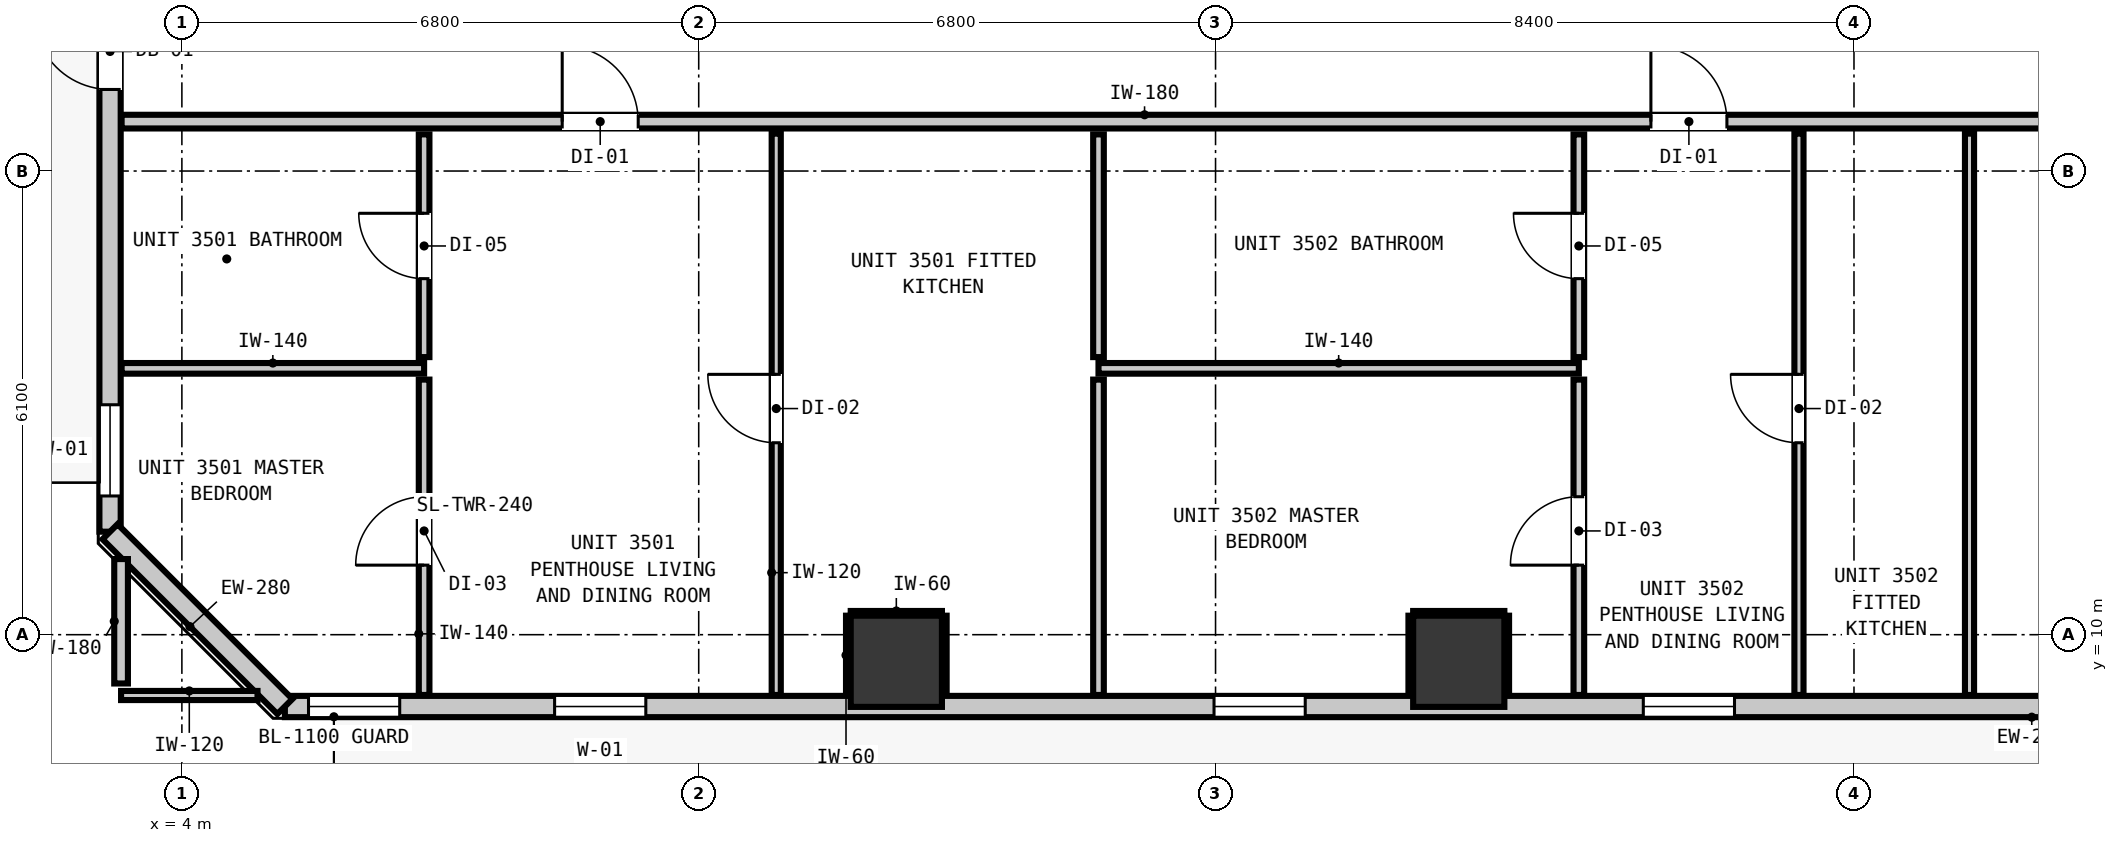
"""IFC4 building model, lengths in metres.
Left out: names, types, materials, properties, quantities, classifications, styles, units other than length and angle.
Written with IfcOpenShell. Run it as: python <this file> out.ifc"""

import sys

from ifc_helpers import new_model, si_unit, direction, frame, frame_2d, origin, origin_2d, place, context, subcontext, project, spatial, rectangle, extrude, element, fill, save


model = new_model("IFC4")
c1 = context("Model", 3, precision=1e-05, world=origin(), true_north=direction((0.0, 1.0)))
c2 = subcontext(c1, "Body", "Model", "MODEL_VIEW")
j1 = project(units=[si_unit("LENGTHUNIT", "METRE"), si_unit("PLANEANGLEUNIT", "RADIAN")], contexts=[c1])
p1 = place(None, origin())
s1 = spatial("IfcSite", under=j1, at=p1, CompositionType="ELEMENT")
p2 = place(p1, origin())
s2 = spatial("IfcBuilding", under=s1, at=p2, CompositionType="ELEMENT")
p3 = place(p2, frame((0.0, 0.0, 122.68)))
s3 = spatial("IfcBuildingStorey", under=s2, at=p3, CompositionType="ELEMENT", Elevation=122.68)
for number, where, z_axis, x_axis in (
    (1, (13.4, 9.65, 0.0), (0.0, 0.0, 1.0), (1.0, 0.0, 0.0)),
    (2, (20.8, 9.65, 0.0), (0.0, 0.0, 1.0), (1.0, 0.0, 0.0)),
):
    element("IfcColumn", number, at=place(p3, frame(where, z_axis=z_axis, x_axis=x_axis)), inside=s3, PredefinedType="COLUMN", context=c2, shape_type="SweptSolid", body=[
        extrude(rectangle(XDim=1.2, YDim=1.2, at=origin_2d()), origin(), (0.0, 0.0, 1.0), 2.9),
    ])
p4 = place(p3, frame((3.055, 11.355, 0.0), z_axis=(0.0, 0.0, 1.0), x_axis=(0.0, 1.0, 0.0)))
e3 = element("IfcWall", 3, at=p4, inside=s3, PredefinedType="STANDARD", context=c2, shape_type="SweptSolid", body=[
    extrude(rectangle(XDim=32.29, YDim=0.28, at=frame_2d((16.145, 0.0))), origin(), (0.0, 0.0, 1.0), 2.9),
])
p5 = place(p4, frame((5.818, 0.0, 0.0)))
e4 = element("IfcOpeningElement", 4, at=p5, cuts=e3, PredefinedType="OPENING", context=c2, shape_type="SweptSolid", body=[
    extrude(rectangle(XDim=1.0, YDim=2.15, at=frame_2d((0.5, 1.075))), frame((0.0, 0.15, 0.0), z_axis=(0.0, -1.0, 0.0), x_axis=(1.0, 0.0, 0.0)), (0.0, 0.0, 1.0), 0.3),
])
p6 = place(p4, frame((0.47, 0.0, 0.85)))
e5 = element("IfcOpeningElement", 5, at=p6, cuts=e3, PredefinedType="OPENING", context=c2, shape_type="SweptSolid", body=[
    extrude(rectangle(XDim=1.2, YDim=1.8, at=frame_2d((0.6, 0.9))), frame((0.0, 0.15, 0.0), z_axis=(0.0, -1.0, 0.0), x_axis=(1.0, 0.0, 0.0)), (0.0, 0.0, 1.0), 0.3),
])
p7 = place(p4, frame((14.395, 0.0, 0.85)))
e6 = element("IfcOpeningElement", 6, at=p7, cuts=e3, PredefinedType="OPENING", context=c2, shape_type="SweptSolid", body=[
    extrude(rectangle(XDim=1.2, YDim=1.8, at=frame_2d((0.6, 0.9))), frame((0.0, 0.15, 0.0), z_axis=(0.0, -1.0, 0.0), x_axis=(1.0, 0.0, 0.0)), (0.0, 0.0, 1.0), 0.3),
])
p8 = place(p3, frame((40.445, 9.055, 0.0), z_axis=(0.0, 0.0, 1.0), x_axis=(-1.0, 0.0, 0.0)))
e7 = element("IfcWall", 7, at=p8, inside=s3, PredefinedType="STANDARD", context=c2, shape_type="SweptSolid", body=[
    extrude(rectangle(XDim=35.09, YDim=0.28, at=frame_2d((17.545, 0.0))), origin(), (0.0, 0.0, 1.0), 2.9),
])
p9 = place(p8, frame((0.904, 0.0, 0.0)))
e8 = element("IfcOpeningElement", 8, at=p9, cuts=e7, PredefinedType="OPENING", context=c2, shape_type="SweptSolid", body=[
    extrude(rectangle(XDim=1.0, YDim=2.15, at=frame_2d((0.5, 1.075))), frame((0.0, 0.15, 0.0), z_axis=(0.0, -1.0, 0.0), x_axis=(1.0, 0.0, 0.0)), (0.0, 0.0, 1.0), 0.3),
])
p10 = place(p8, frame((30.341, 0.0, 0.85)))
e9 = element("IfcOpeningElement", 9, at=p10, cuts=e7, PredefinedType="OPENING", context=c2, shape_type="SweptSolid", body=[
    extrude(rectangle(XDim=1.2, YDim=1.8, at=frame_2d((0.6, 0.9))), frame((0.0, 0.15, 0.0), z_axis=(0.0, -1.0, 0.0), x_axis=(1.0, 0.0, 0.0)), (0.0, 0.0, 1.0), 0.3),
])
p11 = place(p8, frame((33.579, 0.0, 0.85)))
e10 = element("IfcOpeningElement", 10, at=p11, cuts=e7, PredefinedType="OPENING", context=c2, shape_type="SweptSolid", body=[
    extrude(rectangle(XDim=1.2, YDim=1.8, at=frame_2d((0.6, 0.9))), frame((0.0, 0.15, 0.0), z_axis=(0.0, -1.0, 0.0), x_axis=(1.0, 0.0, 0.0)), (0.0, 0.0, 1.0), 0.3),
])
p12 = place(p8, frame((16.017, 0.0, 0.85)))
e11 = element("IfcOpeningElement", 11, at=p12, cuts=e7, PredefinedType="OPENING", context=c2, shape_type="SweptSolid", body=[
    extrude(rectangle(XDim=1.2, YDim=1.8, at=frame_2d((0.6, 0.9))), frame((0.0, 0.15, 0.0), z_axis=(0.0, -1.0, 0.0), x_axis=(1.0, 0.0, 0.0)), (0.0, 0.0, 1.0), 0.3),
])
p13 = place(p8, frame((21.665, 0.0, 0.85)))
e12 = element("IfcOpeningElement", 12, at=p13, cuts=e7, PredefinedType="OPENING", context=c2, shape_type="SweptSolid", body=[
    extrude(rectangle(XDim=1.2, YDim=1.8, at=frame_2d((0.6, 0.9))), frame((0.0, 0.15, 0.0), z_axis=(0.0, -1.0, 0.0), x_axis=(1.0, 0.0, 0.0)), (0.0, 0.0, 1.0), 0.3),
])
p14 = place(p8, frame((6.995, 0.0, 0.85)))
e13 = element("IfcOpeningElement", 13, at=p14, cuts=e7, PredefinedType="OPENING", context=c2, shape_type="SweptSolid", body=[
    extrude(rectangle(XDim=1.2, YDim=1.8, at=frame_2d((0.6, 0.9))), frame((0.0, 0.15, 0.0), z_axis=(0.0, -1.0, 0.0), x_axis=(1.0, 0.0, 0.0)), (0.0, 0.0, 1.0), 0.3),
])
p15 = place(p3, frame((5.355, 9.055, 0.0), z_axis=(0.0, 0.0, 1.0), x_axis=(-0.707106781187, 0.707106781187, 0.0)))
e14 = element("IfcWall", 14, at=p15, inside=s3, PredefinedType="STANDARD", context=c2, shape_type="SweptSolid", body=[
    extrude(rectangle(XDim=3.253, YDim=0.28, at=frame_2d((1.626, 0.0))), origin(), (0.0, 0.0, 1.0), 2.9),
])
p16 = place(p3, frame((3.207, 16.75, 0.0), z_axis=(0.0, 0.0, 1.0), x_axis=(1.0, 0.0, 0.0)))
e15 = element("IfcWall", 15, at=p16, inside=s3, PredefinedType="PARTITIONING", context=c2, shape_type="SweptSolid", body=[
    extrude(rectangle(XDim=39.386, YDim=0.18, at=frame_2d((19.693, 0.0))), origin(), (0.0, 0.0, 1.0), 2.9),
])
p17 = place(p16, frame((5.797, 0.0, 0.0)))
e16 = element("IfcOpeningElement", 16, at=p17, cuts=e15, PredefinedType="OPENING", context=c2, shape_type="SweptSolid", body=[
    extrude(rectangle(XDim=1.0, YDim=2.15, at=frame_2d((0.5, 1.075))), frame((0.0, 0.1, 0.0), z_axis=(0.0, -1.0, 0.0), x_axis=(1.0, 0.0, 0.0)), (0.0, 0.0, 1.0), 0.2),
])
p18 = place(p16, frame((20.121, 0.0, 0.0)))
e17 = element("IfcOpeningElement", 17, at=p18, cuts=e15, PredefinedType="OPENING", context=c2, shape_type="SweptSolid", body=[
    extrude(rectangle(XDim=1.0, YDim=2.15, at=frame_2d((0.5, 1.075))), frame((0.0, 0.1, 0.0), z_axis=(0.0, -1.0, 0.0), x_axis=(1.0, 0.0, 0.0)), (0.0, 0.0, 1.0), 0.2),
])
p19 = place(p16, frame((31.379, 0.0, 0.0)))
e18 = element("IfcOpeningElement", 18, at=p19, cuts=e15, PredefinedType="OPENING", context=c2, shape_type="SweptSolid", body=[
    extrude(rectangle(XDim=0.9, YDim=2.1, at=frame_2d((0.45, 1.05))), frame((0.0, 0.1, 0.0), z_axis=(0.0, -1.0, 0.0), x_axis=(1.0, 0.0, 0.0)), (0.0, 0.0, 1.0), 0.2),
])
p20 = place(p3, frame((3.207, 13.504, 0.0), z_axis=(0.0, 0.0, 1.0), x_axis=(1.0, 0.0, 0.0)))
e19 = element("IfcWall", 19, at=p20, inside=s3, PredefinedType="PARTITIONING", context=c2, shape_type="SweptSolid", body=[
    extrude(rectangle(XDim=3.98, YDim=0.14, at=frame_2d((1.99, 0.0))), origin(), (0.0, 0.0, 1.0), 2.9),
])
p21 = place(p3, frame((16.06, 13.504, 0.0), z_axis=(0.0, 0.0, 1.0), x_axis=(1.0, 0.0, 0.0)))
e20 = element("IfcWall", 20, at=p21, inside=s3, PredefinedType="PARTITIONING", context=c2, shape_type="SweptSolid", body=[
    extrude(rectangle(XDim=6.32, YDim=0.14, at=frame_2d((3.16, 0.0))), origin(), (0.0, 0.0, 1.0), 2.9),
])
p22 = place(p3, frame((3.2, 9.2, 0.0), z_axis=(0.0, 0.0, 1.0), x_axis=(1.0, 0.0, 0.0)))
e21 = element("IfcWall", 21, at=p22, inside=s3, PredefinedType="PARTITIONING", context=c2, shape_type="SweptSolid", body=[
    extrude(rectangle(XDim=1.795, YDim=0.12, at=frame_2d((0.897, 0.0))), origin(), (0.0, 0.0, 1.0), 2.9),
])
p23 = place(p3, frame((3.2, 9.358, 0.0), z_axis=(0.0, 0.0, 1.0), x_axis=(0.0, 1.0, 0.0)))
e22 = element("IfcWall", 22, at=p23, inside=s3, PredefinedType="PARTITIONING", context=c2, shape_type="SweptSolid", body=[
    extrude(rectangle(XDim=1.637, YDim=0.18, at=frame_2d((0.819, 0.0))), origin(), (0.0, 0.0, 1.0), 2.9),
])
p24 = place(p3, frame((7.187, 9.207, 0.0), z_axis=(0.0, 0.0, 1.0), x_axis=(0.0, 1.0, 0.0)))
e23 = element("IfcWall", 23, at=p24, inside=s3, PredefinedType="PARTITIONING", context=c2, shape_type="SweptSolid", body=[
    extrude(rectangle(XDim=4.149, YDim=0.14, at=frame_2d((2.074, 0.0))), origin(), (0.0, 0.0, 1.0), 2.9),
])
p25 = place(p24, frame((1.708, 0.0, 0.0)))
e24 = element("IfcOpeningElement", 24, at=p25, cuts=e23, PredefinedType="OPENING", context=c2, shape_type="SweptSolid", body=[
    extrude(rectangle(XDim=0.9, YDim=2.1, at=frame_2d((0.45, 1.05))), frame((0.0, 0.08, 0.0), z_axis=(0.0, -1.0, 0.0), x_axis=(1.0, 0.0, 0.0)), (0.0, 0.0, 1.0), 0.16),
])
p26 = place(p3, frame((7.187, 13.652, 0.0), z_axis=(0.0, 0.0, 1.0), x_axis=(0.0, 1.0, 0.0)))
e25 = element("IfcWall", 25, at=p26, inside=s3, PredefinedType="PARTITIONING", context=c2, shape_type="SweptSolid", body=[
    extrude(rectangle(XDim=2.93, YDim=0.14, at=frame_2d((1.465, 0.0))), origin(), (0.0, 0.0, 1.0), 2.9),
])
p27 = place(p26, frame((1.032, 0.0, 0.0)))
e26 = element("IfcOpeningElement", 26, at=p27, cuts=e25, PredefinedType="OPENING", context=c2, shape_type="SweptSolid", body=[
    extrude(rectangle(XDim=0.86, YDim=2.02, at=frame_2d((0.43, 1.01))), frame((0.0, 0.08, 0.0), z_axis=(0.0, -1.0, 0.0), x_axis=(1.0, 0.0, 0.0)), (0.0, 0.0, 1.0), 0.16),
])
p28 = place(p3, frame((16.06, 9.207, 0.0), z_axis=(0.0, 0.0, 1.0), x_axis=(0.0, 1.0, 0.0)))
e27 = element("IfcWall", 27, at=p28, inside=s3, PredefinedType="PARTITIONING", context=c2, shape_type="SweptSolid", body=[
    extrude(rectangle(XDim=4.149, YDim=0.14, at=frame_2d((2.074, 0.0))), origin(), (0.0, 0.0, 1.0), 2.9),
])
p29 = place(p3, frame((16.06, 13.652, 0.0), z_axis=(0.0, 0.0, 1.0), x_axis=(0.0, 1.0, 0.0)))
e28 = element("IfcWall", 28, at=p29, inside=s3, PredefinedType="PARTITIONING", context=c2, shape_type="SweptSolid", body=[
    extrude(rectangle(XDim=2.93, YDim=0.14, at=frame_2d((1.465, 0.0))), origin(), (0.0, 0.0, 1.0), 2.9),
])
p30 = place(p3, frame((22.38, 9.207, 0.0), z_axis=(0.0, 0.0, 1.0), x_axis=(0.0, 1.0, 0.0)))
e29 = element("IfcWall", 29, at=p30, inside=s3, PredefinedType="PARTITIONING", context=c2, shape_type="SweptSolid", body=[
    extrude(rectangle(XDim=4.149, YDim=0.14, at=frame_2d((2.074, 0.0))), origin(), (0.0, 0.0, 1.0), 2.9),
])
p31 = place(p30, frame((1.708, 0.0, 0.0)))
e30 = element("IfcOpeningElement", 30, at=p31, cuts=e29, PredefinedType="OPENING", context=c2, shape_type="SweptSolid", body=[
    extrude(rectangle(XDim=0.9, YDim=2.1, at=frame_2d((0.45, 1.05))), frame((0.0, 0.08, 0.0), z_axis=(0.0, -1.0, 0.0), x_axis=(1.0, 0.0, 0.0)), (0.0, 0.0, 1.0), 0.16),
])
p32 = place(p3, frame((22.38, 13.652, 0.0), z_axis=(0.0, 0.0, 1.0), x_axis=(0.0, 1.0, 0.0)))
e31 = element("IfcWall", 31, at=p32, inside=s3, PredefinedType="PARTITIONING", context=c2, shape_type="SweptSolid", body=[
    extrude(rectangle(XDim=2.93, YDim=0.14, at=frame_2d((1.465, 0.0))), origin(), (0.0, 0.0, 1.0), 2.9),
])
p33 = place(p32, frame((1.032, 0.0, 0.0)))
e32 = element("IfcOpeningElement", 32, at=p33, cuts=e31, PredefinedType="OPENING", context=c2, shape_type="SweptSolid", body=[
    extrude(rectangle(XDim=0.86, YDim=2.02, at=frame_2d((0.43, 1.01))), frame((0.0, 0.08, 0.0), z_axis=(0.0, -1.0, 0.0), x_axis=(1.0, 0.0, 0.0)), (0.0, 0.0, 1.0), 0.16),
])
p34 = place(p3, frame((11.82, 9.207, 0.0), z_axis=(0.0, 0.0, 1.0), x_axis=(0.0, 1.0, 0.0)))
e33 = element("IfcWall", 33, at=p34, inside=s3, PredefinedType="PARTITIONING", context=c2, shape_type="SweptSolid", body=[
    extrude(rectangle(XDim=7.385, YDim=0.12, at=frame_2d((3.692, 0.0))), origin(), (0.0, 0.0, 1.0), 2.9),
])
p35 = place(p34, frame((3.318, 0.0, 0.0)))
e34 = element("IfcOpeningElement", 34, at=p35, cuts=e33, PredefinedType="OPENING", context=c2, shape_type="SweptSolid", body=[
    extrude(rectangle(XDim=0.9, YDim=2.1, at=frame_2d((0.45, 1.05))), frame((0.0, 0.07, 0.0), z_axis=(0.0, -1.0, 0.0), x_axis=(1.0, 0.0, 0.0)), (0.0, 0.0, 1.0), 0.14),
])
p36 = place(p3, frame((25.276, 9.207, 0.0), z_axis=(0.0, 0.0, 1.0), x_axis=(0.0, 1.0, 0.0)))
e35 = element("IfcWall", 35, at=p36, inside=s3, PredefinedType="PARTITIONING", context=c2, shape_type="SweptSolid", body=[
    extrude(rectangle(XDim=7.385, YDim=0.12, at=frame_2d((3.692, 0.0))), origin(), (0.0, 0.0, 1.0), 2.9),
])
p37 = place(p36, frame((3.318, 0.0, 0.0)))
e36 = element("IfcOpeningElement", 36, at=p37, cuts=e35, PredefinedType="OPENING", context=c2, shape_type="SweptSolid", body=[
    extrude(rectangle(XDim=0.9, YDim=2.1, at=frame_2d((0.45, 1.05))), frame((0.0, 0.07, 0.0), z_axis=(0.0, -1.0, 0.0), x_axis=(1.0, 0.0, 0.0)), (0.0, 0.0, 1.0), 0.14),
])
p38 = place(p3, frame((27.52, 9.207, 0.0), z_axis=(0.0, 0.0, 1.0), x_axis=(0.0, 1.0, 0.0)))
e37 = element("IfcWall", 37, at=p38, inside=s3, PredefinedType="PARTITIONING", context=c2, shape_type="SweptSolid", body=[
    extrude(rectangle(XDim=7.385, YDim=0.12, at=frame_2d((3.692, 0.0))), origin(), (0.0, 0.0, 1.0), 2.9),
])
p39 = place(p3, frame((12.8, 10.282, 0.0), z_axis=(0.0, 0.0, 1.0), x_axis=(1.0, 0.0, 0.0)))
e38 = element("IfcWall", 38, at=p39, inside=s3, PredefinedType="PARTITIONING", context=c2, shape_type="SweptSolid", body=[
    extrude(rectangle(XDim=1.2, YDim=0.06, at=frame_2d((0.6, 0.0))), origin(), (0.0, 0.0, 1.0), 1.45),
])
for number, where, z_axis, x_axis in (
    (39, (12.768, 9.21, 0.0), (0.0, 0.0, 1.0), (0.0, 1.0, 0.0)),
    (40, (14.032, 9.21, 0.0), (0.0, 0.0, 1.0), (0.0, 1.0, 0.0)),
):
    element("IfcWall", number, at=place(p3, frame(where, z_axis=z_axis, x_axis=x_axis)), inside=s3, PredefinedType="PARTITIONING", context=c2, shape_type="SweptSolid", body=[
        extrude(rectangle(XDim=1.04, YDim=0.06, at=frame_2d((0.52, 0.0))), origin(), (0.0, 0.0, 1.0), 0.905),
    ])
p40 = place(p3, frame((20.2, 10.282, 0.0), z_axis=(0.0, 0.0, 1.0), x_axis=(1.0, 0.0, 0.0)))
e41 = element("IfcWall", 41, at=p40, inside=s3, PredefinedType="PARTITIONING", context=c2, shape_type="SweptSolid", body=[
    extrude(rectangle(XDim=1.2, YDim=0.06, at=frame_2d((0.6, 0.0))), origin(), (0.0, 0.0, 1.0), 1.45),
])
for number, where, z_axis, x_axis in (
    (42, (20.168, 9.21, 0.0), (0.0, 0.0, 1.0), (0.0, 1.0, 0.0)),
    (43, (21.432, 9.21, 0.0), (0.0, 0.0, 1.0), (0.0, 1.0, 0.0)),
):
    element("IfcWall", number, at=place(p3, frame(where, z_axis=z_axis, x_axis=x_axis)), inside=s3, PredefinedType="PARTITIONING", context=c2, shape_type="SweptSolid", body=[
        extrude(rectangle(XDim=1.04, YDim=0.06, at=frame_2d((0.52, 0.0))), origin(), (0.0, 0.0, 1.0), 0.905),
    ])
p41 = place(p5, origin())
e44 = element("IfcDoor", 44, at=p41, inside=s3, OperationType="SINGLE_SWING_RIGHT", PredefinedType="DOOR", context=c2, shape_type="SweptSolid", body=[
    extrude(rectangle(XDim=1.0, YDim=2.15, at=frame_2d((0.5, 1.075))), frame((0.0, 0.025, 0.0), z_axis=(0.0, -1.0, 0.0), x_axis=(1.0, 0.0, 0.0)), (0.0, 0.0, 1.0), 0.05),
])
fill(e4, e44)
p42 = place(p6, origin())
e45 = element("IfcWindow", 45, at=p42, inside=s3, PartitioningType="SINGLE_PANEL", PredefinedType="WINDOW", context=c2, shape_type="SweptSolid", body=[
    extrude(rectangle(XDim=1.2, YDim=1.8, at=frame_2d((0.6, 0.9))), frame((0.0, 0.03, 0.0), z_axis=(0.0, -1.0, 0.0), x_axis=(1.0, 0.0, 0.0)), (0.0, 0.0, 1.0), 0.06),
])
fill(e5, e45)
p43 = place(p10, origin())
e46 = element("IfcWindow", 46, at=p43, inside=s3, PartitioningType="SINGLE_PANEL", PredefinedType="WINDOW", context=c2, shape_type="SweptSolid", body=[
    extrude(rectangle(XDim=1.2, YDim=1.8, at=frame_2d((0.6, 0.9))), frame((0.0, 0.03, 0.0), z_axis=(0.0, -1.0, 0.0), x_axis=(1.0, 0.0, 0.0)), (0.0, 0.0, 1.0), 0.06),
])
fill(e9, e46)
p44 = place(p11, origin())
e47 = element("IfcWindow", 47, at=p44, inside=s3, PartitioningType="SINGLE_PANEL", PredefinedType="WINDOW", context=c2, shape_type="SweptSolid", body=[
    extrude(rectangle(XDim=1.2, YDim=1.8, at=frame_2d((0.6, 0.9))), frame((0.0, 0.03, 0.0), z_axis=(0.0, -1.0, 0.0), x_axis=(1.0, 0.0, 0.0)), (0.0, 0.0, 1.0), 0.06),
])
fill(e10, e47)
p45 = place(p12, origin())
e48 = element("IfcWindow", 48, at=p45, inside=s3, PartitioningType="SINGLE_PANEL", PredefinedType="WINDOW", context=c2, shape_type="SweptSolid", body=[
    extrude(rectangle(XDim=1.2, YDim=1.8, at=frame_2d((0.6, 0.9))), frame((0.0, 0.03, 0.0), z_axis=(0.0, -1.0, 0.0), x_axis=(1.0, 0.0, 0.0)), (0.0, 0.0, 1.0), 0.06),
])
fill(e11, e48)
p46 = place(p13, origin())
e49 = element("IfcWindow", 49, at=p46, inside=s3, PartitioningType="SINGLE_PANEL", PredefinedType="WINDOW", context=c2, shape_type="SweptSolid", body=[
    extrude(rectangle(XDim=1.2, YDim=1.8, at=frame_2d((0.6, 0.9))), frame((0.0, 0.03, 0.0), z_axis=(0.0, -1.0, 0.0), x_axis=(1.0, 0.0, 0.0)), (0.0, 0.0, 1.0), 0.06),
])
fill(e12, e49)
p47 = place(p17, origin())
e50 = element("IfcDoor", 50, at=p47, inside=s3, OperationType="SINGLE_SWING_LEFT", PredefinedType="DOOR", context=c2, shape_type="SweptSolid", body=[
    extrude(rectangle(XDim=1.0, YDim=2.15, at=frame_2d((0.5, 1.075))), frame((0.0, 0.025, 0.0), z_axis=(0.0, -1.0, 0.0), x_axis=(1.0, 0.0, 0.0)), (0.0, 0.0, 1.0), 0.05),
])
fill(e16, e50)
p48 = place(p27, origin())
e51 = element("IfcDoor", 51, at=p48, inside=s3, OperationType="SINGLE_SWING_RIGHT", PredefinedType="DOOR", context=c2, shape_type="SweptSolid", body=[
    extrude(rectangle(XDim=0.86, YDim=2.02, at=frame_2d((0.43, 1.01))), frame((0.0, 0.025, 0.0), z_axis=(0.0, -1.0, 0.0), x_axis=(1.0, 0.0, 0.0)), (0.0, 0.0, 1.0), 0.05),
])
fill(e26, e51)
p49 = place(p25, origin())
e52 = element("IfcDoor", 52, at=p49, inside=s3, OperationType="SINGLE_SWING_LEFT", PredefinedType="DOOR", context=c2, shape_type="SweptSolid", body=[
    extrude(rectangle(XDim=0.9, YDim=2.1, at=frame_2d((0.45, 1.05))), frame((0.0, 0.025, 0.0), z_axis=(0.0, -1.0, 0.0), x_axis=(1.0, 0.0, 0.0)), (0.0, 0.0, 1.0), 0.05),
])
fill(e24, e52)
p50 = place(p35, origin())
e53 = element("IfcDoor", 53, at=p50, inside=s3, OperationType="SINGLE_SWING_RIGHT", PredefinedType="DOOR", context=c2, shape_type="SweptSolid", body=[
    extrude(rectangle(XDim=0.9, YDim=2.1, at=frame_2d((0.45, 1.05))), frame((0.0, 0.025, 0.0), z_axis=(0.0, -1.0, 0.0), x_axis=(1.0, 0.0, 0.0)), (0.0, 0.0, 1.0), 0.05),
])
fill(e34, e53)
p51 = place(p18, origin())
e54 = element("IfcDoor", 54, at=p51, inside=s3, OperationType="SINGLE_SWING_LEFT", PredefinedType="DOOR", context=c2, shape_type="SweptSolid", body=[
    extrude(rectangle(XDim=1.0, YDim=2.15, at=frame_2d((0.5, 1.075))), frame((0.0, 0.025, 0.0), z_axis=(0.0, -1.0, 0.0), x_axis=(1.0, 0.0, 0.0)), (0.0, 0.0, 1.0), 0.05),
])
fill(e17, e54)
p52 = place(p33, origin())
e55 = element("IfcDoor", 55, at=p52, inside=s3, OperationType="SINGLE_SWING_RIGHT", PredefinedType="DOOR", context=c2, shape_type="SweptSolid", body=[
    extrude(rectangle(XDim=0.86, YDim=2.02, at=frame_2d((0.43, 1.01))), frame((0.0, 0.025, 0.0), z_axis=(0.0, -1.0, 0.0), x_axis=(1.0, 0.0, 0.0)), (0.0, 0.0, 1.0), 0.05),
])
fill(e32, e55)
p53 = place(p31, origin())
e56 = element("IfcDoor", 56, at=p53, inside=s3, OperationType="SINGLE_SWING_LEFT", PredefinedType="DOOR", context=c2, shape_type="SweptSolid", body=[
    extrude(rectangle(XDim=0.9, YDim=2.1, at=frame_2d((0.45, 1.05))), frame((0.0, 0.025, 0.0), z_axis=(0.0, -1.0, 0.0), x_axis=(1.0, 0.0, 0.0)), (0.0, 0.0, 1.0), 0.05),
])
fill(e30, e56)
p54 = place(p37, origin())
e57 = element("IfcDoor", 57, at=p54, inside=s3, OperationType="SINGLE_SWING_RIGHT", PredefinedType="DOOR", context=c2, shape_type="SweptSolid", body=[
    extrude(rectangle(XDim=0.9, YDim=2.1, at=frame_2d((0.45, 1.05))), frame((0.0, 0.025, 0.0), z_axis=(0.0, -1.0, 0.0), x_axis=(1.0, 0.0, 0.0)), (0.0, 0.0, 1.0), 0.05),
])
fill(e36, e57)
save(model, sys.argv[1])
